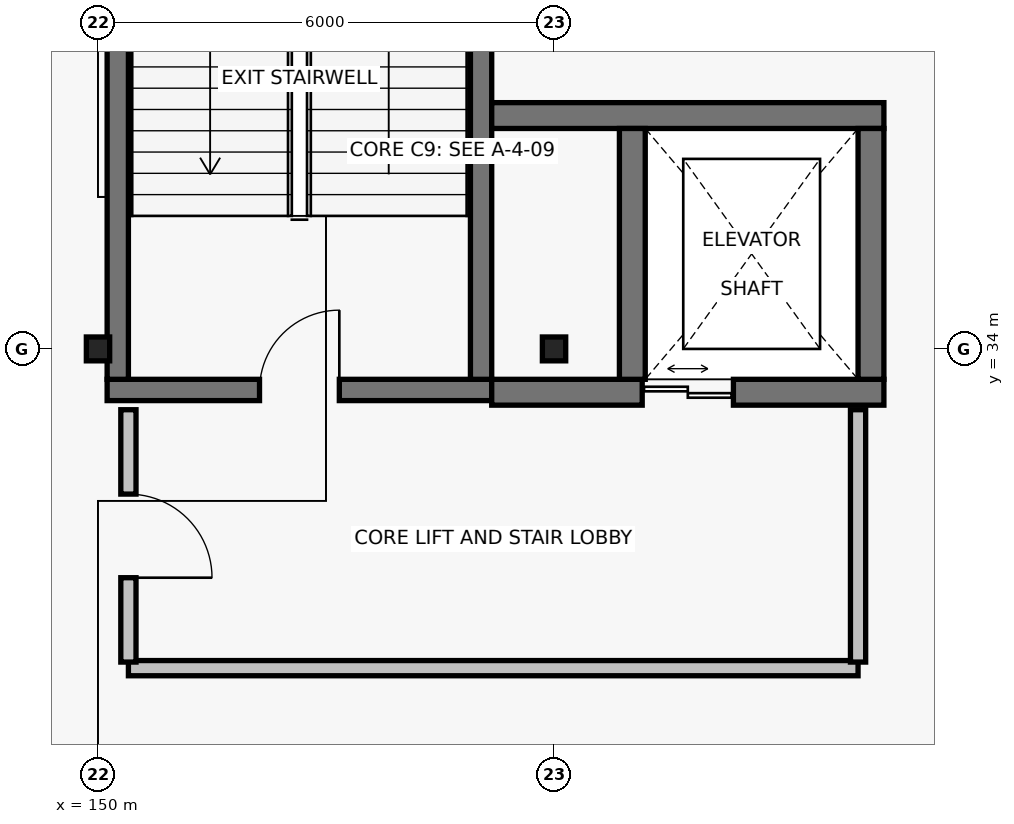
"""IFC4 building model, lengths in metres.
Left out: names, types, materials, properties, quantities, classifications, styles, units other than length and angle.
Written with IfcOpenShell. Run it as: python <this file> out.ifc"""

import sys

from ifc_helpers import new_model, si_unit, direction, frame, frame_2d, origin, origin_2d, place, context, subcontext, project, spatial, rectangle, i_section, extrude, element, fill, save


model = new_model("IFC4")
c1 = context("Model", 3, precision=1e-05, world=origin(), true_north=direction((0.0, 1.0)))
c2 = subcontext(c1, "Body", "Model", "MODEL_VIEW")
j1 = project(units=[si_unit("LENGTHUNIT", "METRE"), si_unit("PLANEANGLEUNIT", "RADIAN")], contexts=[c1])
p1 = place(None, origin())
s1 = spatial("IfcSite", under=j1, at=p1, CompositionType="ELEMENT")
p2 = place(p1, origin())
s2 = spatial("IfcBuilding", under=s1, at=p2, CompositionType="ELEMENT")
p3 = place(p2, frame((0.0, 0.0, 6.6)))
s3 = spatial("IfcBuildingStorey", under=s2, at=p3, CompositionType="ELEMENT", Elevation=6.6)
for number, where, z_axis, x_axis in (
    (1, (150.0, 34.0, 0.0), (0.0, 0.0, 1.0), (1.0, 0.0, 0.0)),
    (2, (156.0, 34.0, 0.0), (0.0, 0.0, 1.0), (1.0, 0.0, 0.0)),
):
    element("IfcColumn", number, at=place(p3, frame(where, z_axis=z_axis, x_axis=x_axis)), inside=s3, PredefinedType="COLUMN", context=c2, shape_type="SweptSolid", body=[
        extrude(i_section(OverallWidth=0.307, OverallDepth=0.314, WebThickness=0.012, FlangeThickness=0.019, FilletRadius=0.014, at=origin_2d()), origin(), (0.0, 0.0, 1.0), 4.8),
    ])
p4 = place(p3, frame((150.12, 33.46, 0.0), z_axis=(0.0, 0.0, 1.0), x_axis=(1.0, 0.0, 0.0)))
e3 = element("IfcWall", 3, at=p4, inside=s3, PredefinedType="SHEAR", context=c2, shape_type="SweptSolid", body=[
    extrude(rectangle(XDim=5.06, YDim=0.28, at=frame_2d((2.53, 0.0))), origin(), (0.0, 0.0, 1.0), 4.54),
])
p5 = place(p4, frame((2.005, 0.0, 0.0)))
e4 = element("IfcOpeningElement", 4, at=p5, cuts=e3, PredefinedType="OPENING", context=c2, shape_type="SweptSolid", body=[
    extrude(rectangle(XDim=1.05, YDim=2.15, at=frame_2d((0.525, 1.075))), frame((0.0, 0.155, 0.0), z_axis=(0.0, -1.0, 0.0), x_axis=(1.0, 0.0, 0.0)), (0.0, 0.0, 1.0), 0.31),
])
for number, where, z_axis, x_axis in (
    (5, (150.26, 43.4, 0.0), (0.0, 0.0, 1.0), (0.0, -1.0, 0.0)),
    (6, (155.04, 33.6, 0.0), (0.0, 0.0, 1.0), (0.0, 1.0, 0.0)),
):
    element("IfcWall", number, at=place(p3, frame(where, z_axis=z_axis, x_axis=x_axis)), inside=s3, PredefinedType="SHEAR", context=c2, shape_type="SweptSolid", body=[
        extrude(rectangle(XDim=9.8, YDim=0.28, at=frame_2d((4.9, 0.0))), origin(), (0.0, 0.0, 1.0), 4.54),
    ])
p6 = place(p3, frame((155.18, 33.43, 0.0), z_axis=(0.0, 0.0, 1.0), x_axis=(1.0, 0.0, 0.0)))
e7 = element("IfcWall", 7, at=p6, inside=s3, PredefinedType="SHEAR", context=c2, shape_type="SweptSolid", body=[
    extrude(rectangle(XDim=5.16, YDim=0.34, at=frame_2d((2.58, 0.0))), origin(), (0.0, 0.0, 1.0), 4.54),
])
p7 = place(p6, frame((1.98, 0.0, 0.0)))
e8 = element("IfcOpeningElement", 8, at=p7, cuts=e7, PredefinedType="OPENING", context=c2, shape_type="SweptSolid", body=[
    extrude(rectangle(XDim=1.2, YDim=2.2, at=frame_2d((0.6, 1.1))), frame((0.0, 0.185, 0.0), z_axis=(0.0, -1.0, 0.0), x_axis=(1.0, 0.0, 0.0)), (0.0, 0.0, 1.0), 0.37),
])
p8 = place(p3, frame((160.34, 37.07, 0.0), z_axis=(0.0, 0.0, 1.0), x_axis=(-1.0, 0.0, 0.0)))
e9 = element("IfcWall", 9, at=p8, inside=s3, PredefinedType="SHEAR", context=c2, shape_type="SweptSolid", body=[
    extrude(rectangle(XDim=5.16, YDim=0.34, at=frame_2d((2.58, 0.0))), origin(), (0.0, 0.0, 1.0), 4.54),
])
for number, where, z_axis, x_axis in (
    (10, (157.03, 36.9, 0.0), (0.0, 0.0, 1.0), (0.0, -1.0, 0.0)),
    (11, (160.17, 33.6, 0.0), (0.0, 0.0, 1.0), (0.0, 1.0, 0.0)),
):
    element("IfcWall", number, at=place(p3, frame(where, z_axis=z_axis, x_axis=x_axis)), inside=s3, PredefinedType="SHEAR", context=c2, shape_type="SweptSolid", body=[
        extrude(rectangle(XDim=3.3, YDim=0.34, at=frame_2d((1.65, 0.0))), origin(), (0.0, 0.0, 1.0), 4.54),
    ])
p9 = place(p3, frame((150.4, 29.8, 0.0), z_axis=(0.0, 0.0, 1.0), x_axis=(1.0, 0.0, 0.0)))
e12 = element("IfcWall", 12, at=p9, inside=s3, PredefinedType="PARTITIONING", context=c2, shape_type="SweptSolid", body=[
    extrude(rectangle(XDim=9.6, YDim=0.2, at=frame_2d((4.8, 0.0))), origin(), (0.0, 0.0, 1.0), 3.911),
])
p10 = place(p3, frame((150.4, 33.2, 0.0), z_axis=(0.0, 0.0, 1.0), x_axis=(0.0, -1.0, 0.0)))
e13 = element("IfcWall", 13, at=p10, inside=s3, PredefinedType="PARTITIONING", context=c2, shape_type="SweptSolid", body=[
    extrude(rectangle(XDim=3.32, YDim=0.2, at=frame_2d((1.66, 0.0))), origin(), (0.0, 0.0, 1.0), 4.48),
])
p11 = place(p10, frame((1.11, 0.0, 0.0)))
e14 = element("IfcOpeningElement", 14, at=p11, cuts=e13, PredefinedType="OPENING", context=c2, shape_type="SweptSolid", body=[
    extrude(rectangle(XDim=1.1, YDim=2.15, at=frame_2d((0.55, 1.075))), frame((0.0, 0.115, 0.0), z_axis=(0.0, -1.0, 0.0), x_axis=(1.0, 0.0, 0.0)), (0.0, 0.0, 1.0), 0.23),
])
p12 = place(p3, frame((160.0, 29.88, 0.0), z_axis=(0.0, 0.0, 1.0), x_axis=(0.0, 1.0, 0.0)))
e15 = element("IfcWall", 15, at=p12, inside=s3, PredefinedType="PARTITIONING", context=c2, shape_type="SweptSolid", body=[
    extrude(rectangle(XDim=3.32, YDim=0.2, at=frame_2d((1.66, 0.0))), origin(), (0.0, 0.0, 1.0), 4.48),
])
p13 = place(p5, origin())
e16 = element("IfcDoor", 16, at=p13, inside=s3, OperationType="SINGLE_SWING_RIGHT", PredefinedType="DOOR", context=c2, shape_type="SweptSolid", body=[
    extrude(rectangle(XDim=1.05, YDim=2.15, at=frame_2d((0.525, 1.075))), frame((0.0, 0.025, 0.0), z_axis=(0.0, -1.0, 0.0), x_axis=(1.0, 0.0, 0.0)), (0.0, 0.0, 1.0), 0.05),
])
fill(e4, e16)
p14 = place(p7, origin())
e17 = element("IfcDoor", 17, at=p14, inside=s3, OperationType="DOUBLE_DOOR_SLIDING", PredefinedType="DOOR", context=c2, shape_type="SweptSolid", body=[
    extrude(rectangle(XDim=1.2, YDim=2.2, at=frame_2d((0.6, 1.1))), frame((0.0, 0.025, 0.0), z_axis=(0.0, -1.0, 0.0), x_axis=(1.0, 0.0, 0.0)), (0.0, 0.0, 1.0), 0.05),
])
fill(e8, e17)
p15 = place(p11, origin())
e18 = element("IfcDoor", 18, at=p15, inside=s3, OperationType="SINGLE_SWING_RIGHT", PredefinedType="DOOR", context=c2, shape_type="SweptSolid", body=[
    extrude(rectangle(XDim=1.1, YDim=2.15, at=frame_2d((0.55, 1.075))), frame((0.0, 0.025, 0.0), z_axis=(0.0, -1.0, 0.0), x_axis=(1.0, 0.0, 0.0)), (0.0, 0.0, 1.0), 0.05),
])
fill(e14, e18)
save(model, sys.argv[1])
